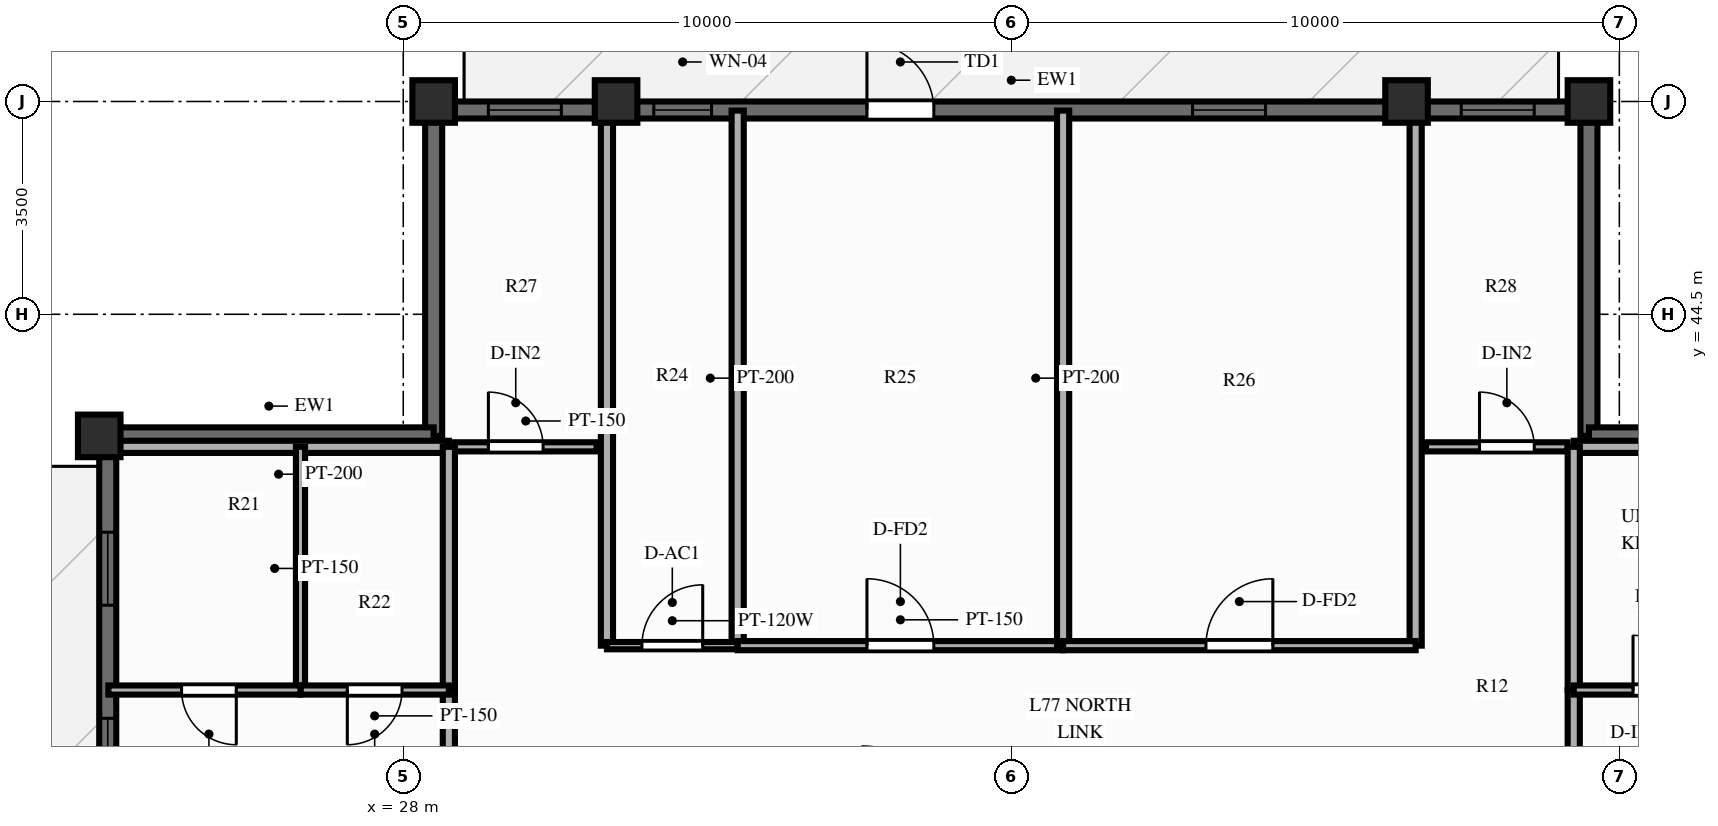
"""IFC4 building model, lengths in metres.
Left out: names, types, materials, properties, quantities, classifications, styles, units other than length and angle.
Written with IfcOpenShell. Run it as: python <this file> out.ifc"""

import sys

from ifc_helpers import new_model, si_unit, direction, frame, frame_2d, origin, origin_2d, place, context, subcontext, project, spatial, rectangle, extrude, source, transform, mapped, element, fill, save


model = new_model("IFC4")
c1 = context("Model", 3, precision=1e-05, world=origin(), true_north=direction((0.0, 1.0)))
c2 = subcontext(c1, "Body", "Model", "MODEL_VIEW")
j1 = project(units=[si_unit("LENGTHUNIT", "METRE"), si_unit("PLANEANGLEUNIT", "RADIAN")], contexts=[c1])
p1 = place(None, origin())
s1 = spatial("IfcSite", under=j1, at=p1, CompositionType="ELEMENT")
p2 = place(p1, origin())
s2 = spatial("IfcBuilding", under=s1, at=p2, CompositionType="ELEMENT")
p3 = place(p2, frame((0.0, 0.0, 249.0)))
s3 = spatial("IfcBuildingStorey", under=s2, at=p3, CompositionType="ELEMENT", Elevation=249.0)
m1 = source(origin(), c2, "Body", "SweptSolid", [
    extrude(rectangle(XDim=0.7, YDim=0.7, at=origin_2d()), origin(), (0.0, 0.0, 1.0), 3.2),
])
for number, where, z_axis, x_axis in (
    (1, (47.5, 48.0, 0.0), (0.0, 0.0, 1.0), (1.0, 0.0, 0.0)),
    (2, (44.5, 48.0, 0.0), (0.0, 0.0, 1.0), (1.0, 0.0, 0.0)),
    (3, (31.5, 48.0, 0.0), (0.0, 0.0, 1.0), (1.0, 0.0, 0.0)),
    (4, (28.5, 48.0, 0.0), (0.0, 0.0, 1.0), (1.0, 0.0, 0.0)),
    (5, (23.0, 42.5, 0.0), (0.0, 0.0, 1.0), (1.0, 0.0, 0.0)),
):
    element("IfcColumn", number, at=place(p3, frame(where, z_axis=z_axis, x_axis=x_axis)), inside=s3, PredefinedType="COLUMN", context=c2, shape_type="MappedRepresentation", body=[
        mapped(m1, transform((0.0, 0.0, 0.0), scale=1.0)),
    ])
p4 = place(p3, frame((28.5, 47.86, 0.0), z_axis=(0.0, 0.0, 1.0), x_axis=(1.0, 0.0, 0.0)))
e6 = element("IfcWall", 6, at=p4, inside=s3, PredefinedType="SOLIDWALL", context=c2, shape_type="SweptSolid", body=[
    extrude(rectangle(XDim=19.0, YDim=0.28, at=frame_2d((9.5, 0.0))), origin(), (0.0, 0.0, 1.0), 2.48),
])
p5 = place(p4, frame((0.9, 0.0, 0.25)))
e7 = element("IfcOpeningElement", 7, at=p5, cuts=e6, PredefinedType="OPENING", context=c2, shape_type="SweptSolid", body=[
    extrude(rectangle(XDim=1.2, YDim=1.5, at=frame_2d((0.6, 0.75))), frame((0.0, 0.152, 0.0), z_axis=(0.0, -1.0, 0.0), x_axis=(1.0, 0.0, 0.0)), (0.0, 0.0, 1.0), 0.304),
])
p6 = place(p4, frame((3.62, 0.0, 0.25)))
e8 = element("IfcOpeningElement", 8, at=p6, cuts=e6, PredefinedType="OPENING", context=c2, shape_type="SweptSolid", body=[
    extrude(rectangle(XDim=0.95, YDim=1.5, at=frame_2d((0.475, 0.75))), frame((0.0, 0.152, 0.0), z_axis=(0.0, -1.0, 0.0), x_axis=(1.0, 0.0, 0.0)), (0.0, 0.0, 1.0), 0.304),
])
p7 = place(p4, frame((7.126, 0.0, 0.0)))
e9 = element("IfcOpeningElement", 9, at=p7, cuts=e6, PredefinedType="OPENING", context=c2, shape_type="SweptSolid", body=[
    extrude(rectangle(XDim=1.1, YDim=2.15, at=frame_2d((0.55, 1.075))), frame((0.0, 0.152, 0.0), z_axis=(0.0, -1.0, 0.0), x_axis=(1.0, 0.0, 0.0)), (0.0, 0.0, 1.0), 0.304),
])
p8 = place(p4, frame((12.481, 0.0, 0.25)))
e10 = element("IfcOpeningElement", 10, at=p8, cuts=e6, PredefinedType="OPENING", context=c2, shape_type="SweptSolid", body=[
    extrude(rectangle(XDim=1.2, YDim=1.5, at=frame_2d((0.6, 0.75))), frame((0.0, 0.152, 0.0), z_axis=(0.0, -1.0, 0.0), x_axis=(1.0, 0.0, 0.0)), (0.0, 0.0, 1.0), 0.304),
])
p9 = place(p4, frame((16.9, 0.0, 0.25)))
e11 = element("IfcOpeningElement", 11, at=p9, cuts=e6, PredefinedType="OPENING", context=c2, shape_type="SweptSolid", body=[
    extrude(rectangle(XDim=1.2, YDim=1.5, at=frame_2d((0.6, 0.75))), frame((0.0, 0.152, 0.0), z_axis=(0.0, -1.0, 0.0), x_axis=(1.0, 0.0, 0.0)), (0.0, 0.0, 1.0), 0.304),
])
p10 = place(p3, frame((23.14, 11.5, 0.0), z_axis=(0.0, 0.0, 1.0), x_axis=(0.0, 1.0, 0.0)))
e12 = element("IfcWall", 12, at=p10, inside=s3, PredefinedType="SOLIDWALL", context=c2, shape_type="SweptSolid", body=[
    extrude(rectangle(XDim=31.0, YDim=0.28, at=frame_2d((15.5, 0.0))), origin(), (0.0, 0.0, 1.0), 2.48),
])
p11 = place(p10, frame((2.035, 0.0, 0.25)))
e13 = element("IfcOpeningElement", 13, at=p11, cuts=e12, PredefinedType="OPENING", context=c2, shape_type="SweptSolid", body=[
    extrude(rectangle(XDim=1.2, YDim=1.5, at=frame_2d((0.6, 0.75))), frame((0.0, 0.152, 0.0), z_axis=(0.0, -1.0, 0.0), x_axis=(1.0, 0.0, 0.0)), (0.0, 0.0, 1.0), 0.304),
])
p12 = place(p10, frame((5.345, 0.0, 0.25)))
e14 = element("IfcOpeningElement", 14, at=p12, cuts=e12, PredefinedType="OPENING", context=c2, shape_type="SweptSolid", body=[
    extrude(rectangle(XDim=0.7, YDim=1.5, at=frame_2d((0.35, 0.75))), frame((0.0, 0.152, 0.0), z_axis=(0.0, -1.0, 0.0), x_axis=(1.0, 0.0, 0.0)), (0.0, 0.0, 1.0), 0.304),
])
p13 = place(p10, frame((10.295, 0.0, 0.0)))
e15 = element("IfcOpeningElement", 15, at=p13, cuts=e12, PredefinedType="OPENING", context=c2, shape_type="SweptSolid", body=[
    extrude(rectangle(XDim=1.6, YDim=2.15, at=frame_2d((0.8, 1.075))), frame((0.0, 0.152, 0.0), z_axis=(0.0, -1.0, 0.0), x_axis=(1.0, 0.0, 0.0)), (0.0, 0.0, 1.0), 0.304),
])
p14 = place(p10, frame((16.892, 0.0, 0.25)))
e16 = element("IfcOpeningElement", 16, at=p14, cuts=e12, PredefinedType="OPENING", context=c2, shape_type="SweptSolid", body=[
    extrude(rectangle(XDim=1.2, YDim=1.5, at=frame_2d((0.6, 0.75))), frame((0.0, 0.152, 0.0), z_axis=(0.0, -1.0, 0.0), x_axis=(1.0, 0.0, 0.0)), (0.0, 0.0, 1.0), 0.304),
])
p15 = place(p10, frame((21.297, 0.0, 0.25)))
e17 = element("IfcOpeningElement", 17, at=p15, cuts=e12, PredefinedType="OPENING", context=c2, shape_type="SweptSolid", body=[
    extrude(rectangle(XDim=1.2, YDim=1.5, at=frame_2d((0.6, 0.75))), frame((0.0, 0.152, 0.0), z_axis=(0.0, -1.0, 0.0), x_axis=(1.0, 0.0, 0.0)), (0.0, 0.0, 1.0), 0.304),
])
p16 = place(p10, frame((25.155, 0.0, 0.25)))
e18 = element("IfcOpeningElement", 18, at=p16, cuts=e12, PredefinedType="OPENING", context=c2, shape_type="SweptSolid", body=[
    extrude(rectangle(XDim=1.2, YDim=1.5, at=frame_2d((0.6, 0.75))), frame((0.0, 0.152, 0.0), z_axis=(0.0, -1.0, 0.0), x_axis=(1.0, 0.0, 0.0)), (0.0, 0.0, 1.0), 0.304),
])
p17 = place(p10, frame((28.215, 0.0, 0.25)))
e19 = element("IfcOpeningElement", 19, at=p17, cuts=e12, PredefinedType="OPENING", context=c2, shape_type="SweptSolid", body=[
    extrude(rectangle(XDim=1.2, YDim=1.5, at=frame_2d((0.6, 0.75))), frame((0.0, 0.152, 0.0), z_axis=(0.0, -1.0, 0.0), x_axis=(1.0, 0.0, 0.0)), (0.0, 0.0, 1.0), 0.304),
])
for number, where, z_axis, x_axis in (
    (20, (28.5, 42.5, 0.0), (0.0, 0.0, 1.0), (0.0, 1.0, 0.0)),
    (21, (23.08, 42.5, 0.0), (0.0, 0.0, 1.0), (1.0, 0.0, 0.0)),
    (22, (47.5, 42.5, 0.0), (0.0, 0.0, 1.0), (0.0, 1.0, 0.0)),
    (23, (47.5, 42.5, 0.0), (0.0, 0.0, 1.0), (1.0, 0.0, 0.0)),
):
    element("IfcWall", number, at=place(p3, frame(where, z_axis=z_axis, x_axis=x_axis)), inside=s3, PredefinedType="SOLIDWALL", context=c2, shape_type="SweptSolid", body=[
        extrude(rectangle(XDim=5.42, YDim=0.28, at=frame_2d((2.71, 0.0))), origin(), (0.0, 0.0, 1.0), 2.48),
    ])
p18 = place(p3, frame((28.85, 42.32, 0.0), z_axis=(0.0, 0.0, 1.0), x_axis=(1.0, 0.0, 0.0)))
e24 = element("IfcWall", 24, at=p18, inside=s3, PredefinedType="PARTITIONING", context=c2, shape_type="SweptSolid", body=[
    extrude(rectangle(XDim=2.33, YDim=0.15, at=frame_2d((1.165, 0.0))), origin(), (0.0, 0.0, 1.0), 2.88),
])
p19 = place(p18, frame((0.55, 0.0, 0.0)))
e25 = element("IfcOpeningElement", 25, at=p19, cuts=e24, PredefinedType="OPENING", context=c2, shape_type="SweptSolid", body=[
    extrude(rectangle(XDim=0.9, YDim=2.1, at=frame_2d((0.45, 1.05))), frame((0.0, 0.087, 0.0), z_axis=(0.0, -1.0, 0.0), x_axis=(1.0, 0.0, 0.0)), (0.0, 0.0, 1.0), 0.174),
])
p20 = place(p3, frame((44.82, 42.32, 0.0), z_axis=(0.0, 0.0, 1.0), x_axis=(1.0, 0.0, 0.0)))
e26 = element("IfcWall", 26, at=p20, inside=s3, PredefinedType="PARTITIONING", context=c2, shape_type="SweptSolid", body=[
    extrude(rectangle(XDim=2.33, YDim=0.15, at=frame_2d((1.165, 0.0))), origin(), (0.0, 0.0, 1.0), 2.88),
])
p21 = place(p20, frame((0.88, 0.0, 0.0)))
e27 = element("IfcOpeningElement", 27, at=p21, cuts=e26, PredefinedType="OPENING", context=c2, shape_type="SweptSolid", body=[
    extrude(rectangle(XDim=0.9, YDim=2.1, at=frame_2d((0.45, 1.05))), frame((0.0, 0.087, 0.0), z_axis=(0.0, -1.0, 0.0), x_axis=(1.0, 0.0, 0.0)), (0.0, 0.0, 1.0), 0.174),
])
for number, where, z_axis, x_axis in (
    (28, (31.35, 39.05, 0.0), (0.0, 0.0, 1.0), (0.0, 1.0, 0.0)),
    (29, (44.65, 39.05, 0.0), (0.0, 0.0, 1.0), (0.0, 1.0, 0.0)),
):
    element("IfcWall", number, at=place(p3, frame(where, z_axis=z_axis, x_axis=x_axis)), inside=s3, PredefinedType="PARTITIONING", context=c2, shape_type="SweptSolid", body=[
        extrude(rectangle(XDim=8.8, YDim=0.2, at=frame_2d((4.4, 0.0))), origin(), (0.0, 0.0, 1.0), 2.59),
    ])
p22 = place(p3, frame((33.5, 39.05, 0.0), z_axis=(0.0, 0.0, 1.0), x_axis=(0.0, 1.0, 0.0)))
e30 = element("IfcWall", 30, at=p22, inside=s3, PredefinedType="PARTITIONING", context=c2, shape_type="SweptSolid", body=[
    extrude(rectangle(XDim=8.8, YDim=0.2, at=frame_2d((4.4, 0.0))), origin(), (0.0, 0.0, 1.0), 2.88),
])
p23 = place(p3, frame((31.35, 39.05, 0.0), z_axis=(0.0, 0.0, 1.0), x_axis=(1.0, 0.0, 0.0)))
e31 = element("IfcWall", 31, at=p23, inside=s3, PredefinedType="PARTITIONING", context=c2, shape_type="SweptSolid", body=[
    extrude(rectangle(XDim=2.15, YDim=0.12, at=frame_2d((1.075, 0.0))), origin(), (0.0, 0.0, 1.0), 2.88),
])
p24 = place(p23, frame((0.575, 0.0, 0.0)))
e32 = element("IfcOpeningElement", 32, at=p24, cuts=e31, PredefinedType="OPENING", context=c2, shape_type="SweptSolid", body=[
    extrude(rectangle(XDim=1.0, YDim=2.1, at=frame_2d((0.5, 1.05))), frame((0.0, 0.072, 0.0), z_axis=(0.0, -1.0, 0.0), x_axis=(1.0, 0.0, 0.0)), (0.0, 0.0, 1.0), 0.144),
])
p25 = place(p3, frame((33.5, 39.05, 0.0), z_axis=(0.0, 0.0, 1.0), x_axis=(1.0, 0.0, 0.0)))
e33 = element("IfcWall", 33, at=p25, inside=s3, PredefinedType="PARTITIONING", context=c2, shape_type="SweptSolid", body=[
    extrude(rectangle(XDim=5.352, YDim=0.15, at=frame_2d((2.676, 0.0))), origin(), (0.0, 0.0, 1.0), 2.88),
])
p26 = place(p25, frame((2.126, 0.0, 0.0)))
e34 = element("IfcOpeningElement", 34, at=p26, cuts=e33, PredefinedType="OPENING", context=c2, shape_type="SweptSolid", body=[
    extrude(rectangle(XDim=1.1, YDim=2.15, at=frame_2d((0.55, 1.075))), frame((0.0, 0.087, 0.0), z_axis=(0.0, -1.0, 0.0), x_axis=(1.0, 0.0, 0.0)), (0.0, 0.0, 1.0), 0.174),
])
p27 = place(p3, frame((38.852, 39.05, 0.0), z_axis=(0.0, 0.0, 1.0), x_axis=(0.0, 1.0, 0.0)))
e35 = element("IfcWall", 35, at=p27, inside=s3, PredefinedType="PARTITIONING", context=c2, shape_type="SweptSolid", body=[
    extrude(rectangle(XDim=8.8, YDim=0.2, at=frame_2d((4.4, 0.0))), origin(), (0.0, 0.0, 1.0), 2.88),
])
p28 = place(p3, frame((38.852, 39.05, 0.0), z_axis=(0.0, 0.0, 1.0), x_axis=(1.0, 0.0, 0.0)))
e36 = element("IfcWall", 36, at=p28, inside=s3, PredefinedType="PARTITIONING", context=c2, shape_type="SweptSolid", body=[
    extrude(rectangle(XDim=5.798, YDim=0.15, at=frame_2d((2.899, 0.0))), origin(), (0.0, 0.0, 1.0), 2.88),
])
p29 = place(p28, frame((2.349, 0.0, 0.0)))
e37 = element("IfcOpeningElement", 37, at=p29, cuts=e36, PredefinedType="OPENING", context=c2, shape_type="SweptSolid", body=[
    extrude(rectangle(XDim=1.1, YDim=2.15, at=frame_2d((0.55, 1.075))), frame((0.0, 0.087, 0.0), z_axis=(0.0, -1.0, 0.0), x_axis=(1.0, 0.0, 0.0)), (0.0, 0.0, 1.0), 0.174),
])
p30 = place(p3, frame((28.75, 42.32, 0.0), z_axis=(0.0, 0.0, 1.0), x_axis=(-1.0, 0.0, 0.0)))
e38 = element("IfcWall", 38, at=p30, inside=s3, PredefinedType="PARTITIONING", context=c2, shape_type="SweptSolid", body=[
    extrude(rectangle(XDim=5.6, YDim=0.2, at=frame_2d((2.8, 0.0))), origin(), (0.0, 0.0, 1.0), 2.88),
])
p31 = place(p3, frame((28.75, 30.983, 0.0), z_axis=(0.0, 0.0, 1.0), x_axis=(0.0, 1.0, 0.0)))
e39 = element("IfcWall", 39, at=p31, inside=s3, PredefinedType="PARTITIONING", context=c2, shape_type="SweptSolid", body=[
    extrude(rectangle(XDim=7.337, YDim=0.2, at=frame_2d((3.668, 0.0))), origin(), (0.0, 0.0, 1.0), 2.88),
])
p32 = place(p31, frame((3.168, 0.0, 0.0)))
e40 = element("IfcOpeningElement", 40, at=p32, cuts=e39, PredefinedType="OPENING", context=c2, shape_type="SweptSolid", body=[
    extrude(rectangle(XDim=1.0, YDim=2.15, at=frame_2d((0.5, 1.075))), frame((0.0, 0.112, 0.0), z_axis=(0.0, -1.0, 0.0), x_axis=(1.0, 0.0, 0.0)), (0.0, 0.0, 1.0), 0.224),
])
p33 = place(p3, frame((28.75, 38.32, 0.0), z_axis=(0.0, 0.0, 1.0), x_axis=(0.0, 1.0, 0.0)))
e41 = element("IfcWall", 41, at=p33, inside=s3, PredefinedType="PARTITIONING", context=c2, shape_type="SweptSolid", body=[
    extrude(rectangle(XDim=4.0, YDim=0.2, at=frame_2d((2.0, 0.0))), origin(), (0.0, 0.0, 1.0), 2.88),
])
p34 = place(p3, frame((26.31, 38.32, 0.0), z_axis=(0.0, 0.0, 1.0), x_axis=(0.0, 1.0, 0.0)))
e42 = element("IfcWall", 42, at=p34, inside=s3, PredefinedType="PARTITIONING", context=c2, shape_type="SweptSolid", body=[
    extrude(rectangle(XDim=4.0, YDim=0.15, at=frame_2d((2.0, 0.0))), origin(), (0.0, 0.0, 1.0), 2.88),
])
p35 = place(p3, frame((28.75, 38.32, 0.0), z_axis=(0.0, 0.0, 1.0), x_axis=(-1.0, 0.0, 0.0)))
e43 = element("IfcWall", 43, at=p35, inside=s3, PredefinedType="PARTITIONING", context=c2, shape_type="SweptSolid", body=[
    extrude(rectangle(XDim=2.44, YDim=0.15, at=frame_2d((1.22, 0.0))), origin(), (0.0, 0.0, 1.0), 2.88),
])
p36 = place(p35, frame((0.77, 0.0, 0.0)))
e44 = element("IfcOpeningElement", 44, at=p36, cuts=e43, PredefinedType="OPENING", context=c2, shape_type="SweptSolid", body=[
    extrude(rectangle(XDim=0.9, YDim=2.1, at=frame_2d((0.45, 1.05))), frame((0.0, 0.087, 0.0), z_axis=(0.0, -1.0, 0.0), x_axis=(1.0, 0.0, 0.0)), (0.0, 0.0, 1.0), 0.174),
])
p37 = place(p3, frame((26.31, 38.32, 0.0), z_axis=(0.0, 0.0, 1.0), x_axis=(-1.0, 0.0, 0.0)))
e45 = element("IfcWall", 45, at=p37, inside=s3, PredefinedType="PARTITIONING", context=c2, shape_type="SweptSolid", body=[
    extrude(rectangle(XDim=3.16, YDim=0.15, at=frame_2d((1.58, 0.0))), origin(), (0.0, 0.0, 1.0), 2.88),
])
p38 = place(p37, frame((1.056, 0.0, 0.0)))
e46 = element("IfcOpeningElement", 46, at=p38, cuts=e45, PredefinedType="OPENING", context=c2, shape_type="SweptSolid", body=[
    extrude(rectangle(XDim=0.9, YDim=2.1, at=frame_2d((0.45, 1.05))), frame((0.0, 0.087, 0.0), z_axis=(0.0, -1.0, 0.0), x_axis=(1.0, 0.0, 0.0)), (0.0, 0.0, 1.0), 0.174),
])
p39 = place(p3, frame((47.25, 42.32, 0.0), z_axis=(0.0, 0.0, 1.0), x_axis=(1.0, 0.0, 0.0)))
e47 = element("IfcWall", 47, at=p39, inside=s3, PredefinedType="PARTITIONING", context=c2, shape_type="SweptSolid", body=[
    extrude(rectangle(XDim=5.6, YDim=0.2, at=frame_2d((2.8, 0.0))), origin(), (0.0, 0.0, 1.0), 2.88),
])
p40 = place(p3, frame((47.25, 35.72, 0.0), z_axis=(0.0, 0.0, 1.0), x_axis=(0.0, 1.0, 0.0)))
e48 = element("IfcWall", 48, at=p40, inside=s3, PredefinedType="PARTITIONING", context=c2, shape_type="SweptSolid", body=[
    extrude(rectangle(XDim=2.6, YDim=0.2, at=frame_2d((1.3, 0.0))), origin(), (0.0, 0.0, 1.0), 2.88),
])
p41 = place(p3, frame((47.25, 38.32, 0.0), z_axis=(0.0, 0.0, 1.0), x_axis=(0.0, 1.0, 0.0)))
e49 = element("IfcWall", 49, at=p41, inside=s3, PredefinedType="PARTITIONING", context=c2, shape_type="SweptSolid", body=[
    extrude(rectangle(XDim=4.0, YDim=0.2, at=frame_2d((2.0, 0.0))), origin(), (0.0, 0.0, 1.0), 2.88),
])
p42 = place(p3, frame((47.25, 38.32, 0.0), z_axis=(0.0, 0.0, 1.0), x_axis=(1.0, 0.0, 0.0)))
e50 = element("IfcWall", 50, at=p42, inside=s3, PredefinedType="PARTITIONING", context=c2, shape_type="SweptSolid", body=[
    extrude(rectangle(XDim=2.85, YDim=0.15, at=frame_2d((1.425, 0.0))), origin(), (0.0, 0.0, 1.0), 2.88),
])
p43 = place(p42, frame((0.975, 0.0, 0.0)))
e51 = element("IfcOpeningElement", 51, at=p43, cuts=e50, PredefinedType="OPENING", context=c2, shape_type="SweptSolid", body=[
    extrude(rectangle(XDim=0.9, YDim=2.1, at=frame_2d((0.45, 1.05))), frame((0.0, 0.087, 0.0), z_axis=(0.0, -1.0, 0.0), x_axis=(1.0, 0.0, 0.0)), (0.0, 0.0, 1.0), 0.174),
])
m2 = source(origin(), c2, "Body", "SweptSolid", [
    extrude(rectangle(XDim=1.2, YDim=1.5, at=frame_2d((0.6, 0.75))), frame((0.0, 0.03, 0.0), z_axis=(0.0, -1.0, 0.0), x_axis=(1.0, 0.0, 0.0)), (0.0, 0.0, 1.0), 0.06),
])
p44 = place(p5, origin())
e52 = element("IfcWindow", 52, at=p44, inside=s3, PartitioningType="SINGLE_PANEL", PredefinedType="WINDOW", context=c2, shape_type="MappedRepresentation", body=[
    mapped(m2, transform((0.0, 0.0, 0.0), scale=1.0)),
])
fill(e7, e52)
m3 = source(origin(), c2, "Body", "SweptSolid", [
    extrude(rectangle(XDim=0.95, YDim=1.5, at=frame_2d((0.475, 0.75))), frame((0.0, 0.03, 0.0), z_axis=(0.0, -1.0, 0.0), x_axis=(1.0, 0.0, 0.0)), (0.0, 0.0, 1.0), 0.06),
])
p45 = place(p6, origin())
e53 = element("IfcWindow", 53, at=p45, inside=s3, PartitioningType="SINGLE_PANEL", PredefinedType="WINDOW", context=c2, shape_type="MappedRepresentation", body=[
    mapped(m3, transform((0.0, 0.0, 0.0), scale=1.0)),
])
fill(e8, e53)
m4 = source(origin(), c2, "Body", "SweptSolid", [
    extrude(rectangle(XDim=1.1, YDim=2.15, at=frame_2d((0.55, 1.075))), frame((0.0, 0.025, 0.0), z_axis=(0.0, -1.0, 0.0), x_axis=(1.0, 0.0, 0.0)), (0.0, 0.0, 1.0), 0.05),
])
p46 = place(p7, origin())
e54 = element("IfcDoor", 54, at=p46, inside=s3, OperationType="SINGLE_SWING_LEFT", PredefinedType="DOOR", context=c2, shape_type="MappedRepresentation", body=[
    mapped(m4, transform((0.0, 0.0, 0.0), scale=1.0)),
])
fill(e9, e54)
p47 = place(p8, origin())
e55 = element("IfcWindow", 55, at=p47, inside=s3, PartitioningType="SINGLE_PANEL", PredefinedType="WINDOW", context=c2, shape_type="MappedRepresentation", body=[
    mapped(m2, transform((0.0, 0.0, 0.0), scale=1.0)),
])
fill(e10, e55)
p48 = place(p9, origin())
e56 = element("IfcWindow", 56, at=p48, inside=s3, PartitioningType="SINGLE_PANEL", PredefinedType="WINDOW", context=c2, shape_type="MappedRepresentation", body=[
    mapped(m2, transform((0.0, 0.0, 0.0), scale=1.0)),
])
fill(e11, e56)
p49 = place(p16, origin())
e57 = element("IfcWindow", 57, at=p49, inside=s3, PartitioningType="SINGLE_PANEL", PredefinedType="WINDOW", context=c2, shape_type="MappedRepresentation", body=[
    mapped(m2, transform((0.0, 0.0, 0.0), scale=1.0)),
])
fill(e18, e57)
p50 = place(p17, origin())
e58 = element("IfcWindow", 58, at=p50, inside=s3, PartitioningType="SINGLE_PANEL", PredefinedType="WINDOW", context=c2, shape_type="MappedRepresentation", body=[
    mapped(m2, transform((0.0, 0.0, 0.0), scale=1.0)),
])
fill(e19, e58)
m5 = source(origin(), c2, "Body", "SweptSolid", [
    extrude(rectangle(XDim=0.9, YDim=2.1, at=frame_2d((0.45, 1.05))), frame((0.0, 0.025, 0.0), z_axis=(0.0, -1.0, 0.0), x_axis=(1.0, 0.0, 0.0)), (0.0, 0.0, 1.0), 0.05),
])
p51 = place(p19, origin())
e59 = element("IfcDoor", 59, at=p51, inside=s3, OperationType="SINGLE_SWING_LEFT", PredefinedType="DOOR", context=c2, shape_type="MappedRepresentation", body=[
    mapped(m5, transform((0.0, 0.0, 0.0), scale=1.0)),
])
fill(e25, e59)
p52 = place(p21, origin())
e60 = element("IfcDoor", 60, at=p52, inside=s3, OperationType="SINGLE_SWING_LEFT", PredefinedType="DOOR", context=c2, shape_type="MappedRepresentation", body=[
    mapped(m5, transform((0.0, 0.0, 0.0), scale=1.0)),
])
fill(e27, e60)
m6 = source(origin(), c2, "Body", "SweptSolid", [
    extrude(rectangle(XDim=1.0, YDim=2.1, at=frame_2d((0.5, 1.05))), frame((0.0, 0.025, 0.0), z_axis=(0.0, -1.0, 0.0), x_axis=(1.0, 0.0, 0.0)), (0.0, 0.0, 1.0), 0.05),
])
p53 = place(p24, origin())
e61 = element("IfcDoor", 61, at=p53, inside=s3, OperationType="SINGLE_SWING_RIGHT", PredefinedType="DOOR", context=c2, shape_type="MappedRepresentation", body=[
    mapped(m6, transform((0.0, 0.0, 0.0), scale=1.0)),
])
fill(e32, e61)
p54 = place(p26, origin())
e62 = element("IfcDoor", 62, at=p54, inside=s3, OperationType="SINGLE_SWING_LEFT", PredefinedType="DOOR", context=c2, shape_type="MappedRepresentation", body=[
    mapped(m4, transform((0.0, 0.0, 0.0), scale=1.0)),
])
fill(e34, e62)
p55 = place(p29, origin())
e63 = element("IfcDoor", 63, at=p55, inside=s3, OperationType="SINGLE_SWING_RIGHT", PredefinedType="DOOR", context=c2, shape_type="MappedRepresentation", body=[
    mapped(m4, transform((0.0, 0.0, 0.0), scale=1.0)),
])
fill(e37, e63)
p56 = place(p36, origin())
e64 = element("IfcDoor", 64, at=p56, inside=s3, OperationType="SINGLE_SWING_RIGHT", PredefinedType="DOOR", context=c2, shape_type="MappedRepresentation", body=[
    mapped(m5, transform((0.0, 0.0, 0.0), scale=1.0)),
])
fill(e44, e64)
p57 = place(p38, origin())
e65 = element("IfcDoor", 65, at=p57, inside=s3, OperationType="SINGLE_SWING_LEFT", PredefinedType="DOOR", context=c2, shape_type="MappedRepresentation", body=[
    mapped(m5, transform((0.0, 0.0, 0.0), scale=1.0)),
])
fill(e46, e65)
p58 = place(p43, origin())
e66 = element("IfcDoor", 66, at=p58, inside=s3, OperationType="SINGLE_SWING_LEFT", PredefinedType="DOOR", context=c2, shape_type="MappedRepresentation", body=[
    mapped(m5, transform((0.0, 0.0, 0.0), scale=1.0)),
])
fill(e51, e66)
save(model, sys.argv[1])
